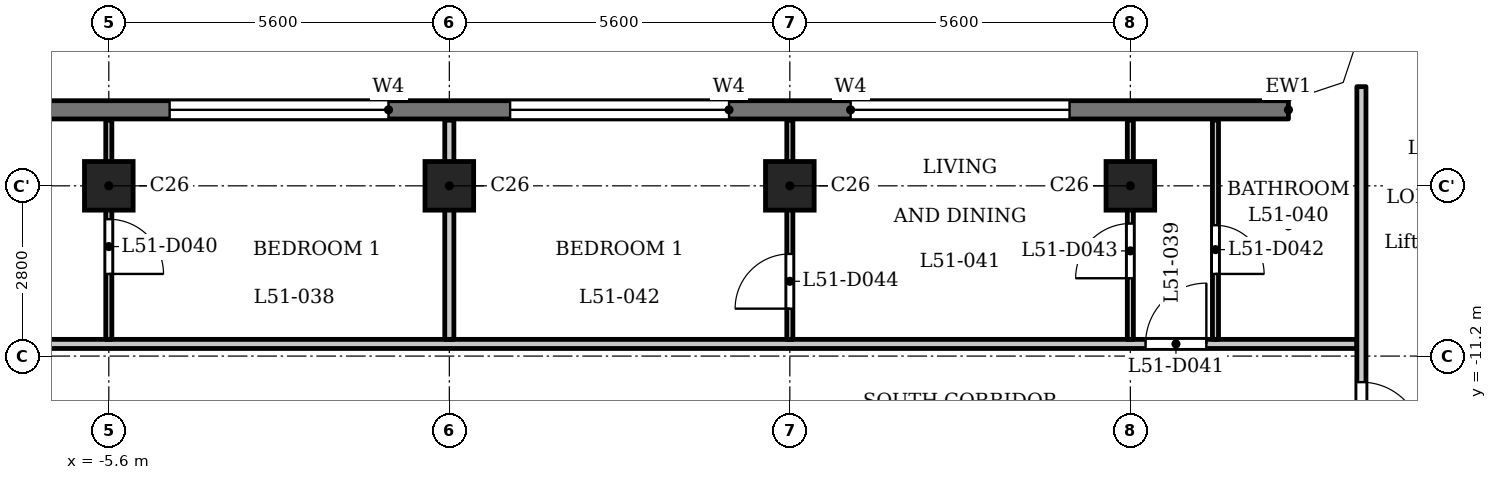
"""IFC4 building model, lengths in metres.
Left out: names, types, materials, properties, quantities, classifications, styles, units other than length and angle.
Written with IfcOpenShell. Run it as: python <this file> out.ifc"""

import sys

from ifc_helpers import new_model, si_unit, direction, frame, frame_2d, origin, origin_2d, place, context, subcontext, project, spatial, polyline, rectangle, outline, extrude, element, fill, save


model = new_model("IFC4")
c1 = context("Model", 3, precision=1e-05, world=origin(), true_north=direction((0.0, 1.0)))
c2 = subcontext(c1, "Body", "Model", "MODEL_VIEW")
j1 = project(units=[si_unit("LENGTHUNIT", "METRE"), si_unit("PLANEANGLEUNIT", "RADIAN")], contexts=[c1])
p1 = place(None, origin())
s1 = spatial("IfcSite", under=j1, at=p1, CompositionType="ELEMENT")
p2 = place(p1, origin())
s2 = spatial("IfcBuilding", under=s1, at=p2, CompositionType="ELEMENT")
p3 = place(p2, frame((0.0, 0.0, 199.4)))
s3 = spatial("IfcBuildingStorey", under=s2, at=p3, CompositionType="ELEMENT", Elevation=199.4)
for number, where, z_axis, x_axis in (
    (1, (-5.6, -8.4, 0.0), (0.0, 0.0, 1.0), (1.0, 0.0, 0.0)),
    (2, (0.0, -8.4, 0.0), (0.0, 0.0, 1.0), (1.0, 0.0, 0.0)),
    (3, (5.6, -8.4, 0.0), (0.0, 0.0, 1.0), (1.0, 0.0, 0.0)),
    (4, (11.2, -8.4, 0.0), (0.0, 0.0, 1.0), (1.0, 0.0, 0.0)),
):
    element("IfcColumn", number, at=place(p3, frame(where, z_axis=z_axis, x_axis=x_axis)), inside=s3, PredefinedType="COLUMN", context=c2, shape_type="SweptSolid", body=[
        extrude(rectangle(XDim=0.8, YDim=0.8, at=origin_2d()), origin(), (0.0, 0.0, 1.0), 3.5),
    ])
p4 = place(p3, frame((13.8, -7.15, 0.0), z_axis=(0.0, 0.0, 1.0), x_axis=(-1.0, 0.0, 0.0)))
e5 = element("IfcWall", 5, at=p4, inside=s3, PredefinedType="SOLIDWALL", context=c2, shape_type="SweptSolid", body=[
    extrude(rectangle(XDim=27.6, YDim=0.3, at=frame_2d((13.8, 0.0))), origin(), (0.0, 0.0, 1.0), 3.2),
])
p5 = place(p4, frame((3.6, 0.0, 1.2)))
e6 = element("IfcOpeningElement", 6, at=p5, cuts=e5, PredefinedType="OPENING", context=c2, shape_type="SweptSolid", body=[
    extrude(rectangle(XDim=3.6, YDim=0.95, at=frame_2d((1.8, 0.475))), frame((0.0, 0.16, 0.0), z_axis=(0.0, -1.0, 0.0), x_axis=(1.0, 0.0, 0.0)), (0.0, 0.0, 1.0), 0.32),
])
p6 = place(p4, frame((9.2, 0.0, 1.2)))
e7 = element("IfcOpeningElement", 7, at=p6, cuts=e5, PredefinedType="OPENING", context=c2, shape_type="SweptSolid", body=[
    extrude(rectangle(XDim=3.6, YDim=0.95, at=frame_2d((1.8, 0.475))), frame((0.0, 0.16, 0.0), z_axis=(0.0, -1.0, 0.0), x_axis=(1.0, 0.0, 0.0)), (0.0, 0.0, 1.0), 0.32),
])
p7 = place(p4, frame((14.8, 0.0, 1.2)))
e8 = element("IfcOpeningElement", 8, at=p7, cuts=e5, PredefinedType="OPENING", context=c2, shape_type="SweptSolid", body=[
    extrude(rectangle(XDim=3.6, YDim=0.95, at=frame_2d((1.8, 0.475))), frame((0.0, 0.16, 0.0), z_axis=(0.0, -1.0, 0.0), x_axis=(1.0, 0.0, 0.0)), (0.0, 0.0, 1.0), 0.32),
])
p8 = place(p4, frame((20.4, 0.0, 1.2)))
e9 = element("IfcOpeningElement", 9, at=p8, cuts=e5, PredefinedType="OPENING", context=c2, shape_type="SweptSolid", body=[
    extrude(rectangle(XDim=3.6, YDim=0.95, at=frame_2d((1.8, 0.475))), frame((0.0, 0.16, 0.0), z_axis=(0.0, -1.0, 0.0), x_axis=(1.0, 0.0, 0.0)), (0.0, 0.0, 1.0), 0.32),
])
p9 = place(p3, frame((-14.925, -11.0, 0.0), z_axis=(0.0, 0.0, 1.0), x_axis=(1.0, 0.0, 0.0)))
e10 = element("IfcWall", 10, at=p9, inside=s3, PredefinedType="PARTITIONING", context=c2, shape_type="SweptSolid", body=[
    extrude(rectangle(XDim=29.85, YDim=0.15, at=frame_2d((14.925, 0.0))), origin(), (0.0, 0.0, 1.0), 3.2),
])
p10 = place(p9, frame((2.575, 0.0, 0.0)))
e11 = element("IfcOpeningElement", 11, at=p10, cuts=e10, PredefinedType="OPENING", context=c2, shape_type="SweptSolid", body=[
    extrude(rectangle(XDim=1.0, YDim=2.1, at=frame_2d((0.5, 1.05))), frame((0.0, 0.085, 0.0), z_axis=(0.0, -1.0, 0.0), x_axis=(1.0, 0.0, 0.0)), (0.0, 0.0, 1.0), 0.17),
])
p11 = place(p9, frame((26.375, 0.0, 0.0)))
e12 = element("IfcOpeningElement", 12, at=p11, cuts=e10, PredefinedType="OPENING", context=c2, shape_type="SweptSolid", body=[
    extrude(rectangle(XDim=1.0, YDim=2.1, at=frame_2d((0.5, 1.05))), frame((0.0, 0.085, 0.0), z_axis=(0.0, -1.0, 0.0), x_axis=(1.0, 0.0, 0.0)), (0.0, 0.0, 1.0), 0.17),
])
p12 = place(p3, frame((-5.6, -10.925, 0.0), z_axis=(0.0, 0.0, 1.0), x_axis=(0.0, 1.0, 0.0)))
e13 = element("IfcWall", 13, at=p12, inside=s3, PredefinedType="PARTITIONING", context=c2, shape_type="SweptSolid", body=[
    extrude(rectangle(XDim=3.605, YDim=0.1, at=frame_2d((1.802, 0.0))), origin(), (0.0, 0.0, 1.0), 3.2),
])
p13 = place(p12, frame((1.076, 0.0, 0.0)))
e14 = element("IfcOpeningElement", 14, at=p13, cuts=e13, PredefinedType="OPENING", context=c2, shape_type="SweptSolid", body=[
    extrude(rectangle(XDim=0.9, YDim=2.1, at=frame_2d((0.45, 1.05))), frame((0.0, 0.06, 0.0), z_axis=(0.0, -1.0, 0.0), x_axis=(1.0, 0.0, 0.0)), (0.0, 0.0, 1.0), 0.12),
])
p14 = place(p3, frame((0.0, -10.925, 0.0), z_axis=(0.0, 0.0, 1.0), x_axis=(0.0, 1.0, 0.0)))
e15 = element("IfcWall", 15, at=p14, inside=s3, PredefinedType="PARTITIONING", context=c2, shape_type="SweptSolid", body=[
    extrude(rectangle(XDim=3.605, YDim=0.15, at=frame_2d((1.802, 0.0))), origin(), (0.0, 0.0, 1.0), 3.2),
])
p15 = place(p3, frame((5.6, -10.925, 0.0), z_axis=(0.0, 0.0, 1.0), x_axis=(0.0, 1.0, 0.0)))
e16 = element("IfcWall", 16, at=p15, inside=s3, PredefinedType="PARTITIONING", context=c2, shape_type="SweptSolid", body=[
    extrude(rectangle(XDim=3.605, YDim=0.1, at=frame_2d((1.802, 0.0))), origin(), (0.0, 0.0, 1.0), 3.2),
])
p16 = place(p15, frame((0.505, 0.0, 0.0)))
e17 = element("IfcOpeningElement", 17, at=p16, cuts=e16, PredefinedType="OPENING", context=c2, shape_type="SweptSolid", body=[
    extrude(rectangle(XDim=0.9, YDim=2.1, at=frame_2d((0.45, 1.05))), frame((0.0, 0.06, 0.0), z_axis=(0.0, -1.0, 0.0), x_axis=(1.0, 0.0, 0.0)), (0.0, 0.0, 1.0), 0.12),
])
p17 = place(p3, frame((11.2, -10.925, 0.0), z_axis=(0.0, 0.0, 1.0), x_axis=(0.0, 1.0, 0.0)))
e18 = element("IfcWall", 18, at=p17, inside=s3, PredefinedType="PARTITIONING", context=c2, shape_type="SweptSolid", body=[
    extrude(rectangle(XDim=3.605, YDim=0.1, at=frame_2d((1.802, 0.0))), origin(), (0.0, 0.0, 1.0), 3.2),
])
p18 = place(p17, frame((1.005, 0.0, 0.0)))
e19 = element("IfcOpeningElement", 19, at=p18, cuts=e18, PredefinedType="OPENING", context=c2, shape_type="SweptSolid", body=[
    extrude(rectangle(XDim=0.9, YDim=2.1, at=frame_2d((0.45, 1.05))), frame((0.0, 0.06, 0.0), z_axis=(0.0, -1.0, 0.0), x_axis=(1.0, 0.0, 0.0)), (0.0, 0.0, 1.0), 0.12),
])
p19 = place(p3, frame((12.6, -10.925, 0.0), z_axis=(0.0, 0.0, 1.0), x_axis=(0.0, 1.0, 0.0)))
e20 = element("IfcWall", 20, at=p19, inside=s3, PredefinedType="PARTITIONING", context=c2, shape_type="SweptSolid", body=[
    extrude(rectangle(XDim=3.605, YDim=0.1, at=frame_2d((1.802, 0.0))), origin(), (0.0, 0.0, 1.0), 3.2),
])
p20 = place(p19, frame((1.076, 0.0, 0.0)))
e21 = element("IfcOpeningElement", 21, at=p20, cuts=e20, PredefinedType="OPENING", context=c2, shape_type="SweptSolid", body=[
    extrude(rectangle(XDim=0.8, YDim=2.1, at=frame_2d((0.4, 1.05))), frame((0.0, 0.06, 0.0), z_axis=(0.0, -1.0, 0.0), x_axis=(1.0, 0.0, 0.0)), (0.0, 0.0, 1.0), 0.12),
])
p21 = place(p3, frame((15.0, -13.125, 0.0), z_axis=(0.0, 0.0, 1.0), x_axis=(0.0, 1.0, 0.0)))
e22 = element("IfcWall", 22, at=p21, inside=s3, PredefinedType="PARTITIONING", context=c2, shape_type="SweptSolid", body=[
    extrude(rectangle(XDim=6.356, YDim=0.15, at=frame_2d((3.178, 0.0))), origin(), (0.0, 0.0, 1.0), 3.2),
])
p22 = place(p21, frame((0.496, 0.0, 0.0)))
e23 = element("IfcOpeningElement", 23, at=p22, cuts=e22, PredefinedType="OPENING", context=c2, shape_type="SweptSolid", body=[
    extrude(rectangle(XDim=1.0, YDim=2.1, at=frame_2d((0.5, 1.05))), frame((0.0, 0.085, 0.0), z_axis=(0.0, -1.0, 0.0), x_axis=(1.0, 0.0, 0.0)), (0.0, 0.0, 1.0), 0.17),
])
p23 = place(p3, origin())
e24 = element("IfcWall", 24, at=p23, inside=s3, PredefinedType="SOLIDWALL", context=c2, shape_type="SweptSolid", body=[
    extrude(outline(polyline([(14.937, -6.937), (15.3, -5.849), (15.3, -5.8), (15.0, -5.8), (14.7, -6.7), (13.8, -7.0), (13.8, -7.3), (13.849, -7.3), (14.937, -6.937)])), origin(), (0.0, 0.0, 1.0), 3.2),
])
p24 = place(p22, origin())
e25 = element("IfcDoor", 25, at=p24, inside=s3, OperationType="SINGLE_SWING_LEFT", PredefinedType="DOOR", context=c2, shape_type="SweptSolid", body=[
    extrude(rectangle(XDim=1.0, YDim=2.1, at=frame_2d((0.5, 1.05))), frame((0.0, 0.025, 0.0), z_axis=(0.0, -1.0, 0.0), x_axis=(1.0, 0.0, 0.0)), (0.0, 0.0, 1.0), 0.05),
])
fill(e23, e25)
p25 = place(p13, origin())
e26 = element("IfcDoor", 26, at=p25, inside=s3, OperationType="SINGLE_SWING_LEFT", PredefinedType="DOOR", context=c2, shape_type="SweptSolid", body=[
    extrude(rectangle(XDim=0.9, YDim=2.1, at=frame_2d((0.45, 1.05))), frame((0.0, 0.025, 0.0), z_axis=(0.0, -1.0, 0.0), x_axis=(1.0, 0.0, 0.0)), (0.0, 0.0, 1.0), 0.05),
])
fill(e14, e26)
p26 = place(p11, origin())
e27 = element("IfcDoor", 27, at=p26, inside=s3, OperationType="SINGLE_SWING_LEFT", PredefinedType="DOOR", context=c2, shape_type="SweptSolid", body=[
    extrude(rectangle(XDim=1.0, YDim=2.1, at=frame_2d((0.5, 1.05))), frame((0.0, 0.025, 0.0), z_axis=(0.0, -1.0, 0.0), x_axis=(1.0, 0.0, 0.0)), (0.0, 0.0, 1.0), 0.05),
])
fill(e12, e27)
p27 = place(p20, origin())
e28 = element("IfcDoor", 28, at=p27, inside=s3, OperationType="SINGLE_SWING_LEFT", PredefinedType="DOOR", context=c2, shape_type="SweptSolid", body=[
    extrude(rectangle(XDim=0.8, YDim=2.1, at=frame_2d((0.4, 1.05))), frame((0.0, 0.025, 0.0), z_axis=(0.0, -1.0, 0.0), x_axis=(1.0, 0.0, 0.0)), (0.0, 0.0, 1.0), 0.05),
])
fill(e21, e28)
p28 = place(p18, origin())
e29 = element("IfcDoor", 29, at=p28, inside=s3, OperationType="SINGLE_SWING_RIGHT", PredefinedType="DOOR", context=c2, shape_type="SweptSolid", body=[
    extrude(rectangle(XDim=0.9, YDim=2.1, at=frame_2d((0.45, 1.05))), frame((0.0, 0.025, 0.0), z_axis=(0.0, -1.0, 0.0), x_axis=(1.0, 0.0, 0.0)), (0.0, 0.0, 1.0), 0.05),
])
fill(e19, e29)
p29 = place(p16, origin())
e30 = element("IfcDoor", 30, at=p29, inside=s3, OperationType="SINGLE_SWING_RIGHT", PredefinedType="DOOR", context=c2, shape_type="SweptSolid", body=[
    extrude(rectangle(XDim=0.9, YDim=2.1, at=frame_2d((0.45, 1.05))), frame((0.0, 0.025, 0.0), z_axis=(0.0, -1.0, 0.0), x_axis=(1.0, 0.0, 0.0)), (0.0, 0.0, 1.0), 0.05),
])
fill(e17, e30)
p30 = place(p5, origin())
e31 = element("IfcWindow", 31, at=p30, inside=s3, PartitioningType="SINGLE_PANEL", PredefinedType="WINDOW", context=c2, shape_type="SweptSolid", body=[
    extrude(rectangle(XDim=3.6, YDim=0.95, at=frame_2d((1.8, 0.475))), frame((0.0, 0.03, 0.0), z_axis=(0.0, -1.0, 0.0), x_axis=(1.0, 0.0, 0.0)), (0.0, 0.0, 1.0), 0.06),
])
fill(e6, e31)
p31 = place(p6, origin())
e32 = element("IfcWindow", 32, at=p31, inside=s3, PartitioningType="SINGLE_PANEL", PredefinedType="WINDOW", context=c2, shape_type="SweptSolid", body=[
    extrude(rectangle(XDim=3.6, YDim=0.95, at=frame_2d((1.8, 0.475))), frame((0.0, 0.03, 0.0), z_axis=(0.0, -1.0, 0.0), x_axis=(1.0, 0.0, 0.0)), (0.0, 0.0, 1.0), 0.06),
])
fill(e7, e32)
p32 = place(p7, origin())
e33 = element("IfcWindow", 33, at=p32, inside=s3, PartitioningType="SINGLE_PANEL", PredefinedType="WINDOW", context=c2, shape_type="SweptSolid", body=[
    extrude(rectangle(XDim=3.6, YDim=0.95, at=frame_2d((1.8, 0.475))), frame((0.0, 0.03, 0.0), z_axis=(0.0, -1.0, 0.0), x_axis=(1.0, 0.0, 0.0)), (0.0, 0.0, 1.0), 0.06),
])
fill(e8, e33)
save(model, sys.argv[1])
